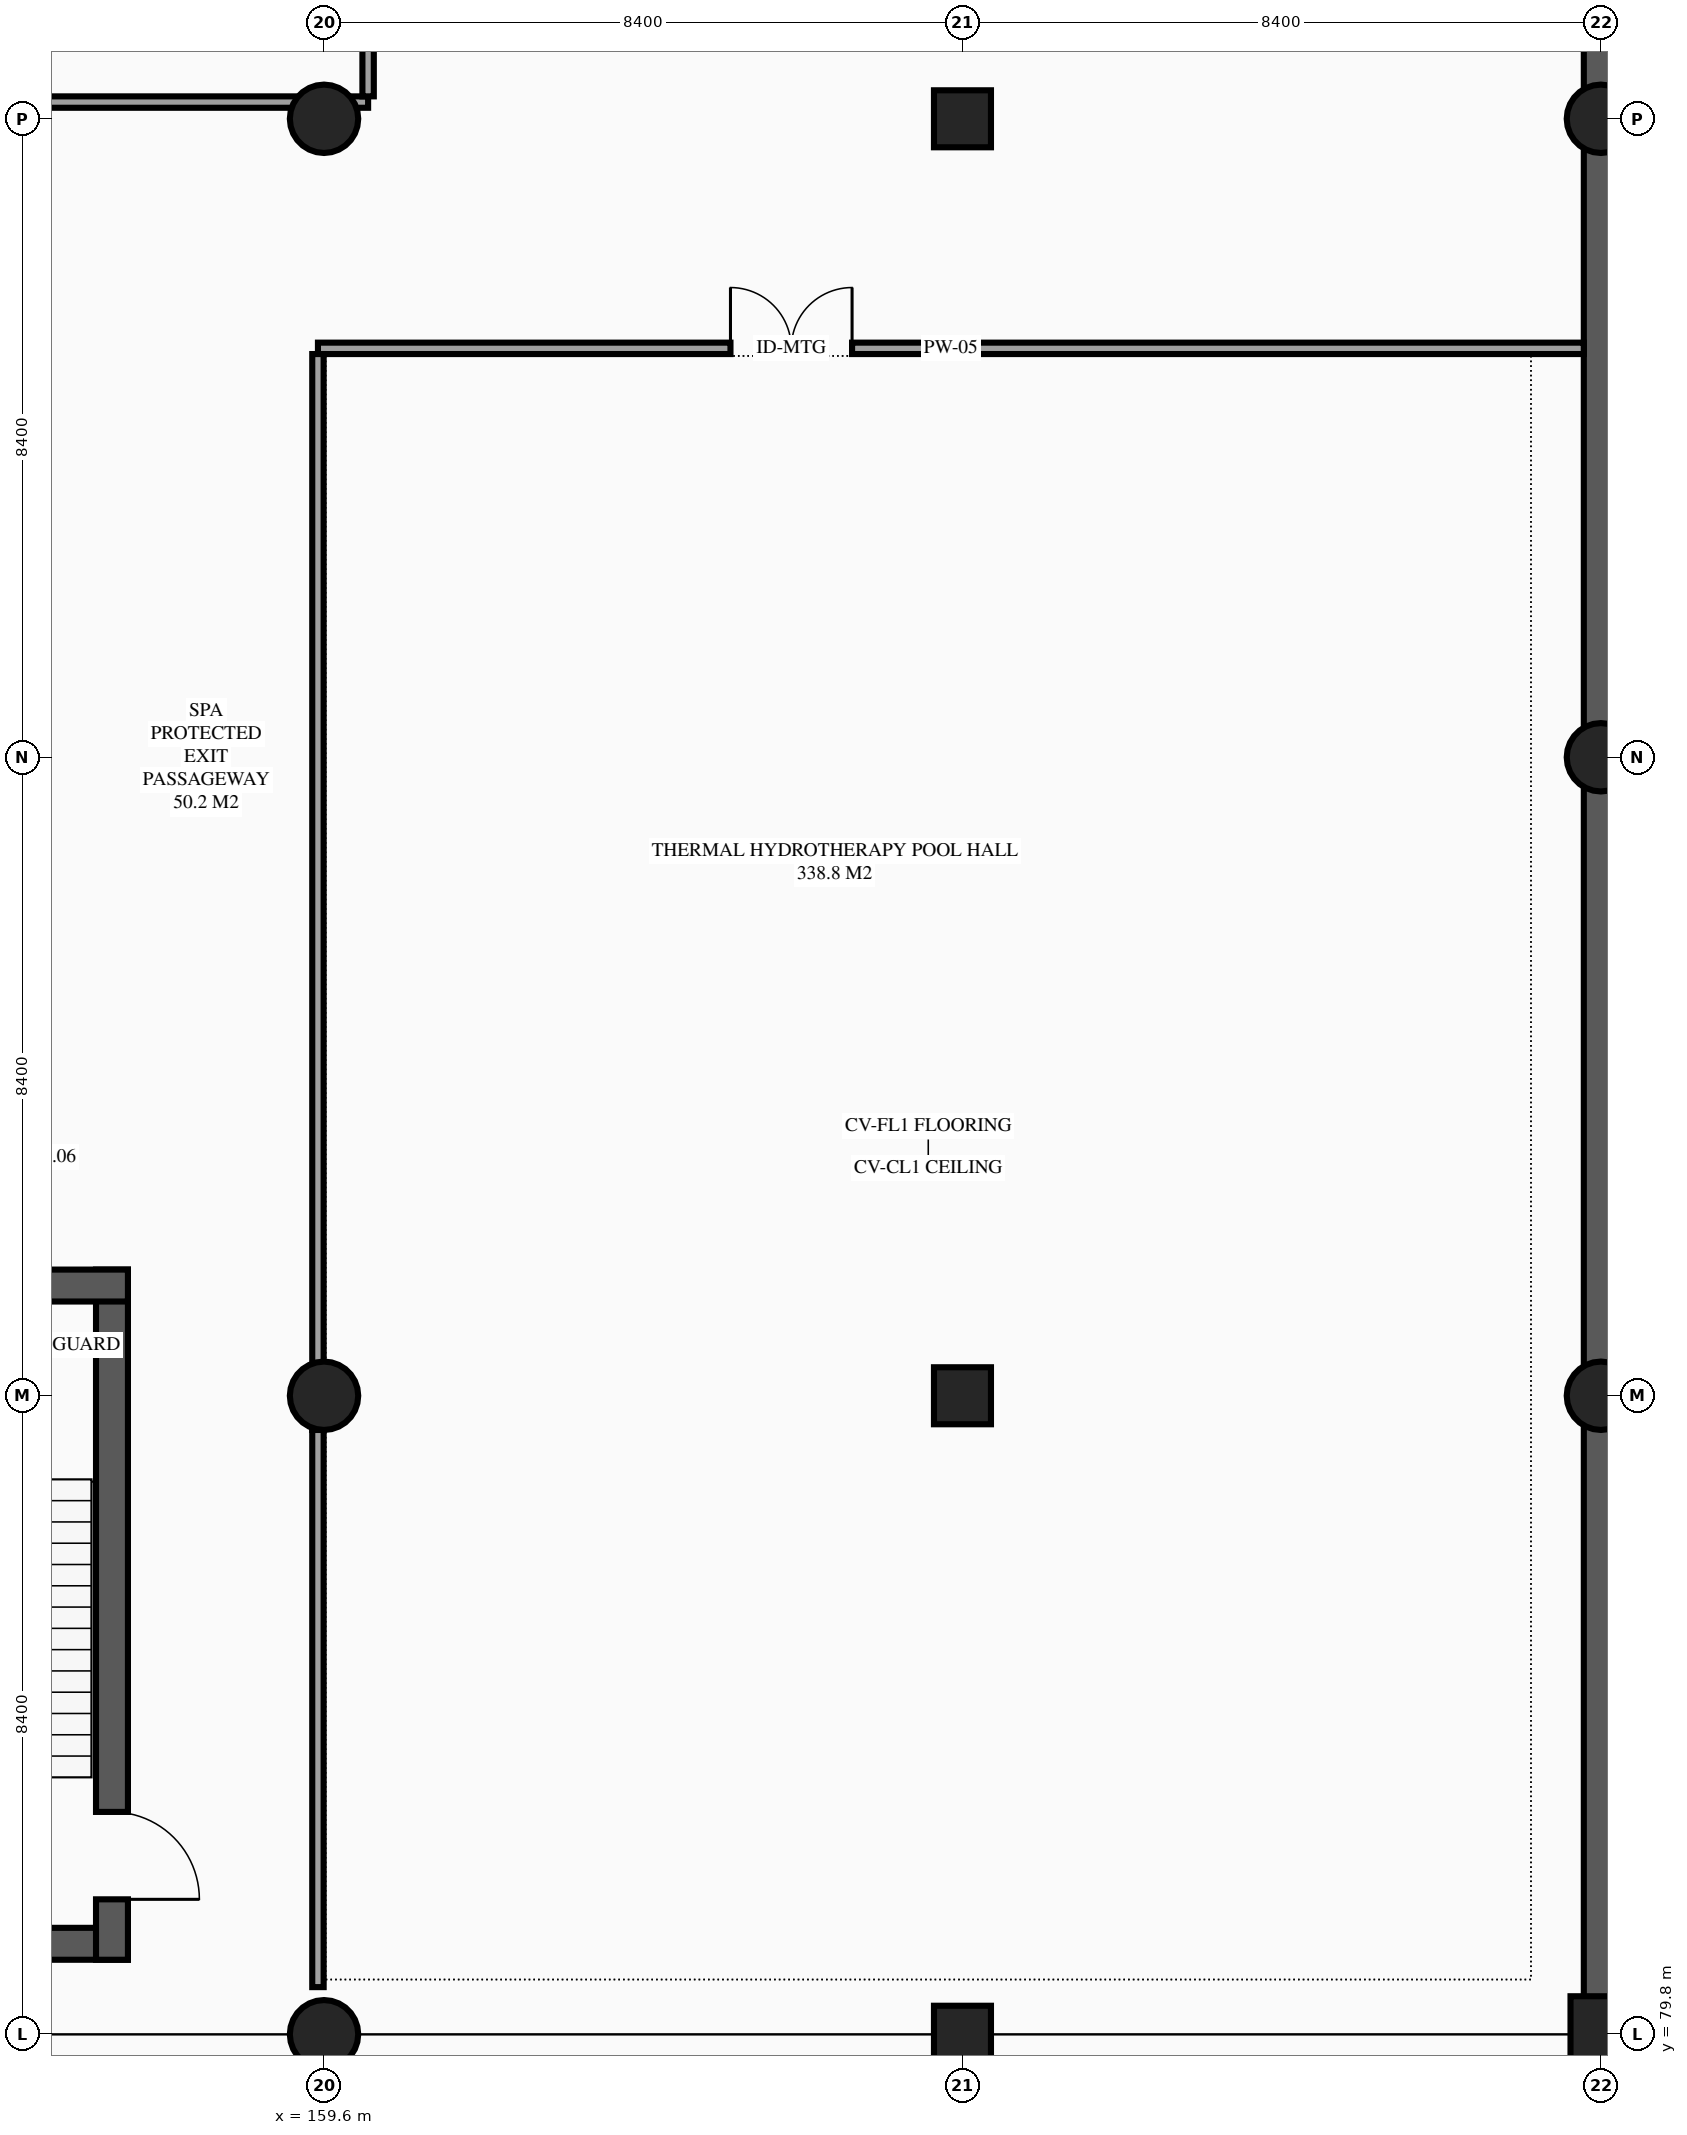
"""IFC4 building model, lengths in metres.
Left out: names, types, materials, properties, quantities, classifications, styles, units other than length and angle.
Written with IfcOpenShell. Run it as: python <this file> out.ifc"""

import sys

from ifc_helpers import new_model, si_unit, direction, frame, frame_2d, origin, origin_2d, place, context, subcontext, project, spatial, rectangle, circle, extrude, element, fill, save


model = new_model("IFC4")
c1 = context("Model", 3, precision=1e-05, world=origin(), true_north=direction((0.0, 1.0)))
c2 = subcontext(c1, "Body", "Model", "MODEL_VIEW")
j1 = project(units=[si_unit("LENGTHUNIT", "METRE"), si_unit("PLANEANGLEUNIT", "RADIAN")], contexts=[c1])
p1 = place(None, origin())
s1 = spatial("IfcSite", under=j1, at=p1, CompositionType="ELEMENT")
p2 = place(p1, origin())
s2 = spatial("IfcBuilding", under=s1, at=p2, CompositionType="ELEMENT")
p3 = place(p2, origin())
s3 = spatial("IfcBuildingStorey", under=s2, at=p3, CompositionType="ELEMENT", Elevation=0.0)
for number, where, z_axis, x_axis in (
    (1, (159.6, 79.8, 0.0), (0.0, 0.0, 1.0), (1.0, 0.0, 0.0)),
    (2, (159.6, 88.2, 0.0), (0.0, 0.0, 1.0), (1.0, 0.0, 0.0)),
    (3, (159.6, 105.0, 0.0), (0.0, 0.0, 1.0), (1.0, 0.0, 0.0)),
):
    element("IfcColumn", number, at=place(p3, frame(where, z_axis=z_axis, x_axis=x_axis)), inside=s3, PredefinedType="COLUMN", context=c2, shape_type="SweptSolid", body=[
        extrude(circle(Radius=0.45, at=origin_2d()), origin(), (0.0, 0.0, 1.0), 5.4),
    ])
for number, where, z_axis, x_axis in (
    (4, (168.0, 79.8, 0.0), (0.0, 0.0, 1.0), (1.0, 0.0, 0.0)),
    (5, (168.0, 88.2, 0.0), (0.0, 0.0, 1.0), (1.0, 0.0, 0.0)),
    (6, (168.0, 105.0, 0.0), (0.0, 0.0, 1.0), (1.0, 0.0, 0.0)),
):
    element("IfcColumn", number, at=place(p3, frame(where, z_axis=z_axis, x_axis=x_axis)), inside=s3, PredefinedType="COLUMN", context=c2, shape_type="SweptSolid", body=[
        extrude(rectangle(XDim=0.75, YDim=0.75, at=origin_2d()), origin(), (0.0, 0.0, 1.0), 5.4),
    ])
p4 = place(p3, frame((176.4, 79.8, 0.0), z_axis=(0.0, 0.0, 1.0), x_axis=(1.0, 0.0, 0.0)))
e7 = element("IfcColumn", 7, at=p4, inside=s3, PredefinedType="COLUMN", context=c2, shape_type="SweptSolid", body=[
    extrude(rectangle(XDim=0.8, YDim=1.0, at=origin_2d()), origin(), (0.0, 0.0, 1.0), 5.4),
])
for number, where, z_axis, x_axis in (
    (8, (176.4, 88.2, 0.0), (0.0, 0.0, 1.0), (1.0, 0.0, 0.0)),
    (9, (176.4, 96.6, 0.0), (0.0, 0.0, 1.0), (1.0, 0.0, 0.0)),
    (10, (176.4, 105.0, 0.0), (0.0, 0.0, 1.0), (1.0, 0.0, 0.0)),
):
    element("IfcColumn", number, at=place(p3, frame(where, z_axis=z_axis, x_axis=x_axis)), inside=s3, PredefinedType="COLUMN", context=c2, shape_type="SweptSolid", body=[
        extrude(circle(Radius=0.45, at=origin_2d()), origin(), (0.0, 0.0, 1.0), 5.4),
    ])
p5 = place(p3, frame((176.4, 71.4, 0.0), z_axis=(0.0, 0.0, 1.0), x_axis=(0.0, 1.0, 0.0)))
e11 = element("IfcWall", 11, at=p5, inside=s3, PredefinedType="STANDARD", context=c2, shape_type="SweptSolid", body=[
    extrude(rectangle(XDim=8.4, YDim=0.45, at=frame_2d((4.2, 0.0))), origin(), (0.0, 0.0, 1.0), 5.4),
])
p6 = place(p3, frame((176.4, 79.8, 0.0), z_axis=(0.0, 0.0, 1.0), x_axis=(0.0, 1.0, 0.0)))
e12 = element("IfcWall", 12, at=p6, inside=s3, PredefinedType="STANDARD", context=c2, shape_type="SweptSolid", body=[
    extrude(rectangle(XDim=8.4, YDim=0.45, at=frame_2d((4.2, 0.0))), origin(), (0.0, 0.0, 1.0), 5.4),
])
p7 = place(p3, frame((176.4, 88.2, 0.0), z_axis=(0.0, 0.0, 1.0), x_axis=(0.0, 1.0, 0.0)))
e13 = element("IfcWall", 13, at=p7, inside=s3, PredefinedType="STANDARD", context=c2, shape_type="SweptSolid", body=[
    extrude(rectangle(XDim=8.4, YDim=0.45, at=frame_2d((4.2, 0.0))), origin(), (0.0, 0.0, 1.0), 5.4),
])
p8 = place(p3, frame((176.4, 96.6, 0.0), z_axis=(0.0, 0.0, 1.0), x_axis=(0.0, 1.0, 0.0)))
e14 = element("IfcWall", 14, at=p8, inside=s3, PredefinedType="STANDARD", context=c2, shape_type="SweptSolid", body=[
    extrude(rectangle(XDim=8.4, YDim=0.45, at=frame_2d((4.2, 0.0))), origin(), (0.0, 0.0, 1.0), 5.4),
])
p9 = place(p3, frame((176.4, 105.0, 0.0), z_axis=(0.0, 0.0, 1.0), x_axis=(0.0, 1.0, 0.0)))
e15 = element("IfcWall", 15, at=p9, inside=s3, PredefinedType="STANDARD", context=c2, shape_type="SweptSolid", body=[
    extrude(rectangle(XDim=7.8, YDim=0.45, at=frame_2d((3.9, 0.0))), origin(), (0.0, 0.0, 1.0), 5.4),
])
p10 = place(p3, frame((151.58, 80.99, 0.0), z_axis=(0.0, 0.0, 1.0), x_axis=(1.0, 0.0, 0.0)))
e16 = element("IfcWall", 16, at=p10, inside=s3, PredefinedType="SHEAR", context=c2, shape_type="SweptSolid", body=[
    extrude(rectangle(XDim=5.44, YDim=0.42, at=frame_2d((2.72, 0.0))), origin(), (0.0, 0.0, 1.0), 5.4),
])
p11 = place(p3, frame((156.81, 80.78, 0.0), z_axis=(0.0, 0.0, 1.0), x_axis=(0.0, 1.0, 0.0)))
e17 = element("IfcWall", 17, at=p11, inside=s3, PredefinedType="SHEAR", context=c2, shape_type="SweptSolid", body=[
    extrude(rectangle(XDim=9.08, YDim=0.42, at=frame_2d((4.54, 0.0))), origin(), (0.0, 0.0, 1.0), 5.4),
])
p12 = place(p11, frame((1.945, 0.0, 0.0), z_axis=(0.0, 0.0, 1.0), x_axis=(-1.0, 0.0, 0.0)))
e18 = element("IfcOpeningElement", 18, at=p12, cuts=e17, PredefinedType="OPENING", context=c2, shape_type="SweptSolid", body=[
    extrude(rectangle(XDim=1.15, YDim=2.15, at=frame_2d((0.575, 1.075))), frame((0.0, 0.22, 0.0), z_axis=(0.0, -1.0, 0.0), x_axis=(1.0, 0.0, 0.0)), (0.0, 0.0, 1.0), 0.44),
])
p13 = place(p3, frame((157.02, 89.65, 0.0), z_axis=(0.0, 0.0, 1.0), x_axis=(-1.0, 0.0, 0.0)))
e19 = element("IfcWall", 19, at=p13, inside=s3, PredefinedType="SHEAR", context=c2, shape_type="SweptSolid", body=[
    extrude(rectangle(XDim=5.44, YDim=0.42, at=frame_2d((2.72, 0.0))), origin(), (0.0, 0.0, 1.0), 5.4),
])
p14 = place(p3, frame((159.52, 101.98, 0.0), z_axis=(0.0, 0.0, 1.0), x_axis=(1.0, 0.0, 0.0)))
e20 = element("IfcWall", 20, at=p14, inside=s3, PredefinedType="PARTITIONING", context=c2, shape_type="SweptSolid", body=[
    extrude(rectangle(XDim=16.655, YDim=0.15, at=frame_2d((8.328, 0.0))), origin(), (0.0, 0.0, 1.0), 5.135),
])
p15 = place(p14, frame((5.427, 0.0, 0.0)))
e21 = element("IfcOpeningElement", 21, at=p15, cuts=e20, PredefinedType="OPENING", context=c2, shape_type="SweptSolid", body=[
    extrude(rectangle(XDim=1.6, YDim=2.25, at=frame_2d((0.8, 1.125))), frame((0.0, 0.085, 0.0), z_axis=(0.0, -1.0, 0.0), x_axis=(1.0, 0.0, 0.0)), (0.0, 0.0, 1.0), 0.17),
])
p16 = place(p3, frame((159.52, 87.75, 0.0), z_axis=(0.0, 0.0, 1.0), x_axis=(0.0, 1.0, 0.0)))
e22 = element("IfcWall", 22, at=p16, inside=s3, PredefinedType="PARTITIONING", context=c2, shape_type="SweptSolid", body=[
    extrude(rectangle(XDim=14.155, YDim=0.15, at=frame_2d((7.078, 0.0))), origin(), (0.0, 0.0, 1.0), 5.135),
])
p17 = place(p3, frame((151.575, 105.22, 0.0), z_axis=(0.0, 0.0, 1.0), x_axis=(1.0, 0.0, 0.0)))
e23 = element("IfcWall", 23, at=p17, inside=s3, PredefinedType="PARTITIONING", context=c2, shape_type="SweptSolid", body=[
    extrude(rectangle(XDim=8.605, YDim=0.15, at=frame_2d((4.302, 0.0))), origin(), (0.0, 0.0, 1.0), 4.24),
])
p18 = place(p17, frame((0.975, 0.0, 0.0)))
e24 = element("IfcOpeningElement", 24, at=p18, cuts=e23, PredefinedType="OPENING", context=c2, shape_type="SweptSolid", body=[
    extrude(rectangle(XDim=1.6, YDim=2.25, at=frame_2d((0.8, 1.125))), frame((0.0, 0.085, 0.0), z_axis=(0.0, -1.0, 0.0), x_axis=(1.0, 0.0, 0.0)), (0.0, 0.0, 1.0), 0.17),
])
p19 = place(p3, frame((160.18, 105.295, 0.0), z_axis=(0.0, 0.0, 1.0), x_axis=(0.0, 1.0, 0.0)))
e25 = element("IfcWall", 25, at=p19, inside=s3, PredefinedType="PARTITIONING", context=c2, shape_type="SweptSolid", body=[
    extrude(rectangle(XDim=7.325, YDim=0.15, at=frame_2d((3.663, 0.0))), origin(), (0.0, 0.0, 1.0), 5.135),
])
p20 = place(p3, frame((159.52, 80.42, 0.0), z_axis=(0.0, 0.0, 1.0), x_axis=(0.0, 1.0, 0.0)))
e26 = element("IfcWall", 26, at=p20, inside=s3, PredefinedType="PARTITIONING", context=c2, shape_type="SweptSolid", body=[
    extrude(rectangle(XDim=7.33, YDim=0.15, at=frame_2d((3.665, 0.0))), origin(), (0.0, 0.0, 1.0), 4.29),
])
p21 = place(p12, origin())
e27 = element("IfcDoor", 27, at=p21, inside=s3, OperationType="SINGLE_SWING_LEFT", PredefinedType="DOOR", context=c2, shape_type="SweptSolid", body=[
    extrude(rectangle(XDim=1.15, YDim=2.15, at=frame_2d((0.575, 1.075))), frame((0.0, 0.025, 0.0), z_axis=(0.0, -1.0, 0.0), x_axis=(1.0, 0.0, 0.0)), (0.0, 0.0, 1.0), 0.05),
])
fill(e18, e27)
p22 = place(p15, origin())
e28 = element("IfcDoor", 28, at=p22, inside=s3, OperationType="DOUBLE_DOOR_SINGLE_SWING", PredefinedType="DOOR", context=c2, shape_type="SweptSolid", body=[
    extrude(rectangle(XDim=1.6, YDim=2.25, at=frame_2d((0.8, 1.125))), frame((0.0, 0.025, 0.0), z_axis=(0.0, -1.0, 0.0), x_axis=(1.0, 0.0, 0.0)), (0.0, 0.0, 1.0), 0.05),
])
fill(e21, e28)
save(model, sys.argv[1])
